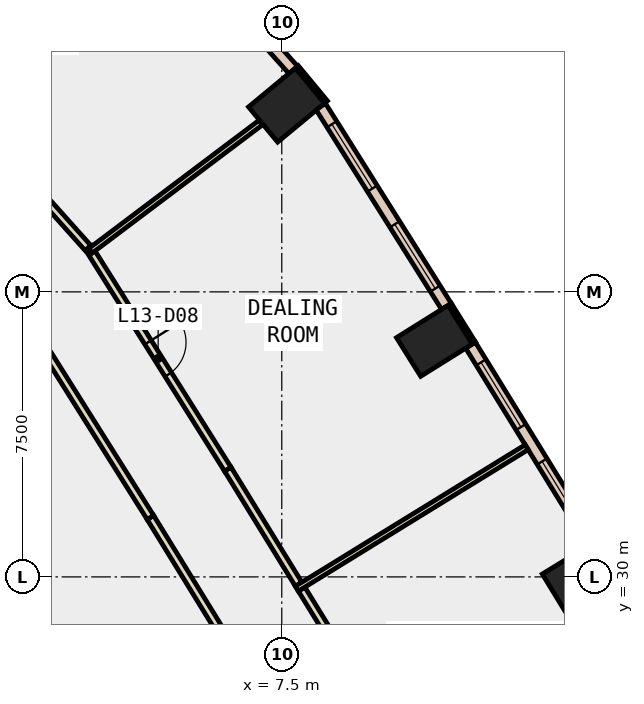
"""IFC4 building model, lengths in metres.
Left out: names, types, materials, properties, quantities, classifications, styles, units other than length and angle.
Written with IfcOpenShell. Run it as: python <this file> out.ifc"""

import sys

from ifc_helpers import new_model, si_unit, direction, frame, frame_2d, origin, origin_2d, place, context, subcontext, project, spatial, rectangle, extrude, element, fill, save


model = new_model("IFC4")
c1 = context("Model", 3, precision=1e-05, world=origin(), true_north=direction((0.0, 1.0)))
c2 = subcontext(c1, "Body", "Model", "MODEL_VIEW")
j1 = project(units=[si_unit("LENGTHUNIT", "METRE"), si_unit("PLANEANGLEUNIT", "RADIAN")], contexts=[c1])
p1 = place(None, origin())
s1 = spatial("IfcSite", under=j1, at=p1, CompositionType="ELEMENT")
p2 = place(p1, origin())
s2 = spatial("IfcBuilding", under=s1, at=p2, CompositionType="ELEMENT")
p3 = place(p2, frame((0.0, 0.0, 64.4)))
s3 = spatial("IfcBuildingStorey", under=s2, at=p3, CompositionType="ELEMENT", Elevation=64.4)
for number, where, z_axis, x_axis in (
    (1, (15.351, 29.981, -0.4), (0.0, 0.0, 1.0), (-0.522, 0.853, 0.0)),
    (2, (11.516, 36.211, -0.4), (0.0, 0.0, 1.0), (-0.53, 0.848, 0.0)),
    (3, (7.625, 42.414, -0.4), (0.0, 0.0, 1.0), (-0.638, 0.77, 0.0)),
):
    element("IfcColumn", number, at=place(p3, frame(where, z_axis=z_axis, x_axis=x_axis)), inside=s3, PredefinedType="COLUMN", context=c2, shape_type="SweptSolid", body=[
        extrude(rectangle(XDim=1.2, YDim=1.6, at=origin_2d()), origin(), (0.0, 0.0, 1.0), 4.2),
    ])
p4 = place(p3, frame((12.555, 36.153, 0.0), z_axis=(0.0, 0.0, 1.0), x_axis=(-0.530273374944, 0.847826720401, 0.0)))
e4 = element("IfcWall", 4, at=p4, inside=s3, PredefinedType="STANDARD", context=c2, shape_type="SweptSolid", body=[
    extrude(rectangle(XDim=1.199, YDim=0.1, at=frame_2d((0.6, 0.0))), origin(), (0.0, 0.0, 1.0), 3.8),
])
p5 = place(p3, frame((8.662, 42.494, 0.0), z_axis=(0.0, 0.0, 1.0), x_axis=(-0.637759271497, 0.770235750676, 0.0)))
e5 = element("IfcWall", 5, at=p5, inside=s3, PredefinedType="STANDARD", context=c2, shape_type="SweptSolid", body=[
    extrude(rectangle(XDim=1.2, YDim=0.1, at=frame_2d((0.6, 0.0))), origin(), (0.0, 0.0, 1.0), 3.8),
])
p6 = place(p3, frame((15.677, 30.882, 0.0), z_axis=(0.0, 0.0, 1.0), x_axis=(-0.524239751329, 0.851570715282, 0.0)))
e6 = element("IfcWall", 6, at=p6, inside=s3, PredefinedType="STANDARD", context=c2, shape_type="SweptSolid", body=[
    extrude(rectangle(XDim=6.125, YDim=0.3, at=frame_2d((3.062, 0.0))), origin(), (0.0, 0.0, 1.0), 3.8),
])
p7 = place(p6, frame((0.531, 0.0, 0.9)))
e7 = element("IfcOpeningElement", 7, at=p7, cuts=e6, PredefinedType="OPENING", context=c2, shape_type="SweptSolid", body=[
    extrude(rectangle(XDim=2.0, YDim=2.6, at=frame_2d((1.0, 1.3))), frame((0.0, 0.16, 0.0), z_axis=(0.0, -1.0, 0.0), x_axis=(1.0, 0.0, 0.0)), (0.0, 0.0, 1.0), 0.32),
])
p8 = place(p6, frame((3.594, 0.0, 0.9)))
e8 = element("IfcOpeningElement", 8, at=p8, cuts=e6, PredefinedType="OPENING", context=c2, shape_type="SweptSolid", body=[
    extrude(rectangle(XDim=2.0, YDim=2.6, at=frame_2d((1.0, 1.3))), frame((0.0, 0.16, 0.0), z_axis=(0.0, -1.0, 0.0), x_axis=(1.0, 0.0, 0.0)), (0.0, 0.0, 1.0), 0.32),
])
p9 = place(p3, frame((11.833, 37.116, 0.0), z_axis=(0.0, 0.0, 1.0), x_axis=(-0.532322705893, 0.846541515102, 0.0)))
e9 = element("IfcWall", 9, at=p9, inside=s3, PredefinedType="STANDARD", context=c2, shape_type="SweptSolid", body=[
    extrude(rectangle(XDim=6.218, YDim=0.3, at=frame_2d((3.109, 0.0))), origin(), (0.0, 0.0, 1.0), 3.8),
])
p10 = place(p9, frame((0.555, 0.0, 0.9)))
e10 = element("IfcOpeningElement", 10, at=p10, cuts=e9, PredefinedType="OPENING", context=c2, shape_type="SweptSolid", body=[
    extrude(rectangle(XDim=2.0, YDim=2.6, at=frame_2d((1.0, 1.3))), frame((0.0, 0.16, 0.0), z_axis=(0.0, -1.0, 0.0), x_axis=(1.0, 0.0, 0.0)), (0.0, 0.0, 1.0), 0.32),
])
p11 = place(p9, frame((3.664, 0.0, 0.9)))
e11 = element("IfcOpeningElement", 11, at=p11, cuts=e9, PredefinedType="OPENING", context=c2, shape_type="SweptSolid", body=[
    extrude(rectangle(XDim=2.0, YDim=2.6, at=frame_2d((1.0, 1.3))), frame((0.0, 0.16, 0.0), z_axis=(0.0, -1.0, 0.0), x_axis=(1.0, 0.0, 0.0)), (0.0, 0.0, 1.0), 0.32),
])
p12 = place(p3, frame((7.803, 43.339, 0.0), z_axis=(0.0, 0.0, 1.0), x_axis=(-0.666901909312, 0.745145518242, 0.0)))
e12 = element("IfcWall", 12, at=p12, inside=s3, PredefinedType="STANDARD", context=c2, shape_type="SweptSolid", body=[
    extrude(rectangle(XDim=3.666, YDim=0.3, at=frame_2d((1.833, 0.0))), origin(), (0.0, 0.0, 1.0), 3.8),
])
p13 = place(p12, frame((1.133, 0.0, 0.9)))
e13 = element("IfcOpeningElement", 13, at=p13, cuts=e12, PredefinedType="OPENING", context=c2, shape_type="SweptSolid", body=[
    extrude(rectangle(XDim=1.4, YDim=2.6, at=frame_2d((0.7, 1.3))), frame((0.0, 0.16, 0.0), z_axis=(0.0, -1.0, 0.0), x_axis=(1.0, 0.0, 0.0)), (0.0, 0.0, 1.0), 0.32),
])
p14 = place(p3, frame((7.835, 25.404, 0.0), z_axis=(0.0, 0.0, 1.0), x_axis=(-0.524225471951, 0.851579505717, 0.0)))
e14 = element("IfcWall", 14, at=p14, inside=s3, PredefinedType="PARTITIONING", context=c2, shape_type="SweptSolid", body=[
    extrude(rectangle(XDim=7.233, YDim=0.2, at=frame_2d((3.617, 0.0))), origin(), (0.0, 0.0, 1.0), 3.8),
])
p15 = place(p3, frame((4.043, 31.564, 0.0), z_axis=(0.0, 0.0, 1.0), x_axis=(-0.532301094997, 0.846555104092, 0.0)))
e15 = element("IfcWall", 15, at=p15, inside=s3, PredefinedType="PARTITIONING", context=c2, shape_type="SweptSolid", body=[
    extrude(rectangle(XDim=6.677, YDim=0.2, at=frame_2d((3.338, 0.0))), origin(), (0.0, 0.0, 1.0), 3.8),
])
p16 = place(p3, frame((8.022, 29.678, 0.0), z_axis=(0.0, 0.0, 1.0), x_axis=(0.524093591744, -0.851660676029, 0.0)))
e16 = element("IfcWall", 16, at=p16, inside=s3, PredefinedType="PARTITIONING", context=c2, shape_type="SweptSolid", body=[
    extrude(rectangle(XDim=3.553, YDim=0.2, at=frame_2d((1.776, 0.0))), origin(), (0.0, 0.0, 1.0), 3.8),
])
p17 = place(p3, frame((2.413, 38.665, 0.0), z_axis=(0.0, 0.0, 1.0), x_axis=(0.532328273879, -0.846538013812, 0.0)))
e17 = element("IfcWall", 17, at=p17, inside=s3, PredefinedType="PARTITIONING", context=c2, shape_type="SweptSolid", body=[
    extrude(rectangle(XDim=6.89, YDim=0.2, at=frame_2d((3.445, 0.0))), origin(), (0.0, 0.0, 1.0), 3.8),
])
p18 = place(p17, frame((2.945, 0.0, 0.0)))
e18 = element("IfcOpeningElement", 18, at=p18, cuts=e17, PredefinedType="OPENING", context=c2, shape_type="SweptSolid", body=[
    extrude(rectangle(XDim=1.0, YDim=2.1, at=frame_2d((0.5, 1.05))), frame((0.0, 0.11, 0.0), z_axis=(0.0, -1.0, 0.0), x_axis=(1.0, 0.0, 0.0)), (0.0, 0.0, 1.0), 0.22),
])
p19 = place(p3, frame((6.081, 32.832, 0.0), z_axis=(0.0, 0.0, 1.0), x_axis=(0.524062922014, -0.851679548756, 0.0)))
e19 = element("IfcWall", 19, at=p19, inside=s3, PredefinedType="PARTITIONING", context=c2, shape_type="SweptSolid", body=[
    extrude(rectangle(XDim=3.553, YDim=0.2, at=frame_2d((1.777, 0.0))), origin(), (0.0, 0.0, 1.0), 3.8),
])
p20 = place(p3, frame((0.879, 40.355, 0.0), z_axis=(0.0, 0.0, 1.0), x_axis=(0.666791730919, -0.745244112743, 0.0)))
e20 = element("IfcWall", 20, at=p20, inside=s3, PredefinedType="PARTITIONING", context=c2, shape_type="SweptSolid", body=[
    extrude(rectangle(XDim=2.281, YDim=0.2, at=frame_2d((1.141, 0.0))), origin(), (0.0, 0.0, 1.0), 3.8),
])
p21 = place(p3, frame((7.897, 29.69, 0.0), z_axis=(0.0, 0.0, 1.0), x_axis=(0.851604009471, 0.524185664677, 0.0)))
e21 = element("IfcWall", 21, at=p21, inside=s3, PredefinedType="PARTITIONING", context=c2, shape_type="SweptSolid", body=[
    extrude(rectangle(XDim=7.101, YDim=0.15, at=frame_2d((3.55, 0.0))), origin(), (0.0, 0.0, 1.0), 3.8),
])
p22 = place(p3, frame((2.466, 38.58, 0.0), z_axis=(0.0, 0.0, 1.0), x_axis=(0.798796148738, 0.601601789193, 0.0)))
e22 = element("IfcWall", 22, at=p22, inside=s3, PredefinedType="PARTITIONING", context=c2, shape_type="SweptSolid", body=[
    extrude(rectangle(XDim=5.605, YDim=0.15, at=frame_2d((2.802, 0.0))), origin(), (0.0, 0.0, 1.0), 3.8),
])
p23 = place(p7, origin())
e23 = element("IfcWindow", 23, at=p23, inside=s3, PartitioningType="SINGLE_PANEL", PredefinedType="WINDOW", context=c2, shape_type="SweptSolid", body=[
    extrude(rectangle(XDim=2.0, YDim=2.6, at=frame_2d((1.0, 1.3))), frame((0.0, 0.03, 0.0), z_axis=(0.0, -1.0, 0.0), x_axis=(1.0, 0.0, 0.0)), (0.0, 0.0, 1.0), 0.06),
])
fill(e7, e23)
p24 = place(p8, origin())
e24 = element("IfcWindow", 24, at=p24, inside=s3, PartitioningType="SINGLE_PANEL", PredefinedType="WINDOW", context=c2, shape_type="SweptSolid", body=[
    extrude(rectangle(XDim=2.0, YDim=2.6, at=frame_2d((1.0, 1.3))), frame((0.0, 0.03, 0.0), z_axis=(0.0, -1.0, 0.0), x_axis=(1.0, 0.0, 0.0)), (0.0, 0.0, 1.0), 0.06),
])
fill(e8, e24)
p25 = place(p10, origin())
e25 = element("IfcWindow", 25, at=p25, inside=s3, PartitioningType="SINGLE_PANEL", PredefinedType="WINDOW", context=c2, shape_type="SweptSolid", body=[
    extrude(rectangle(XDim=2.0, YDim=2.6, at=frame_2d((1.0, 1.3))), frame((0.0, 0.03, 0.0), z_axis=(0.0, -1.0, 0.0), x_axis=(1.0, 0.0, 0.0)), (0.0, 0.0, 1.0), 0.06),
])
fill(e10, e25)
p26 = place(p11, origin())
e26 = element("IfcWindow", 26, at=p26, inside=s3, PartitioningType="SINGLE_PANEL", PredefinedType="WINDOW", context=c2, shape_type="SweptSolid", body=[
    extrude(rectangle(XDim=2.0, YDim=2.6, at=frame_2d((1.0, 1.3))), frame((0.0, 0.03, 0.0), z_axis=(0.0, -1.0, 0.0), x_axis=(1.0, 0.0, 0.0)), (0.0, 0.0, 1.0), 0.06),
])
fill(e11, e26)
p27 = place(p18, origin())
e27 = element("IfcDoor", 27, at=p27, inside=s3, OperationType="SINGLE_SWING_LEFT", PredefinedType="DOOR", context=c2, shape_type="SweptSolid", body=[
    extrude(rectangle(XDim=1.0, YDim=2.1, at=frame_2d((0.5, 1.05))), frame((0.0, 0.025, 0.0), z_axis=(0.0, -1.0, 0.0), x_axis=(1.0, 0.0, 0.0)), (0.0, 0.0, 1.0), 0.05),
])
fill(e18, e27)
save(model, sys.argv[1])
